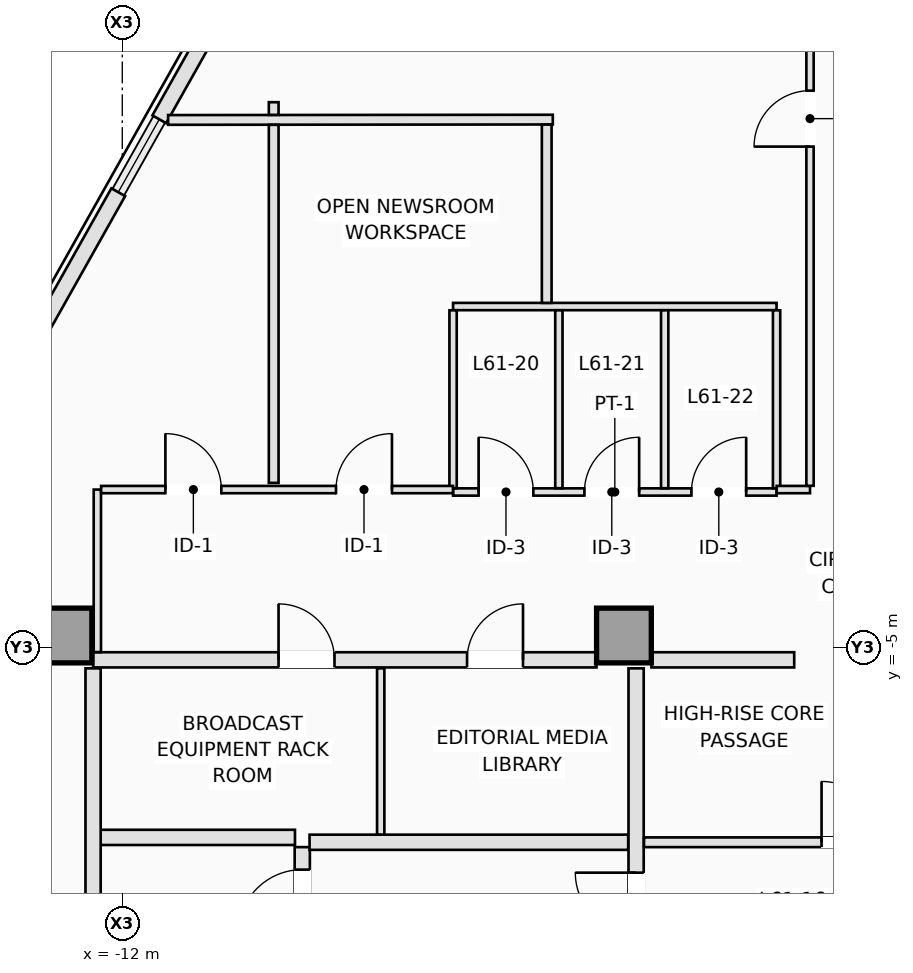
"""IFC4 building model, lengths in metres.
Left out: names, types, materials, properties, quantities, classifications, styles, units other than length and angle.
Written with IfcOpenShell. Run it as: python <this file> out.ifc"""

import sys

from ifc_helpers import new_model, si_unit, direction, frame, frame_2d, origin, origin_2d, place, context, subcontext, project, spatial, rectangle, extrude, element, fill, save


model = new_model("IFC4")
c1 = context("Model", 3, precision=1e-05, world=origin(), true_north=direction((0.0, 1.0)))
c2 = subcontext(c1, "Body", "Model", "MODEL_VIEW")
j1 = project(units=[si_unit("LENGTHUNIT", "METRE"), si_unit("PLANEANGLEUNIT", "RADIAN")], contexts=[c1])
p1 = place(None, origin())
s1 = spatial("IfcSite", under=j1, at=p1, CompositionType="ELEMENT")
p2 = place(p1, origin())
s2 = spatial("IfcBuilding", under=s1, at=p2, CompositionType="ELEMENT")
p3 = place(p2, frame((0.0, 0.0, 221.9)))
s3 = spatial("IfcBuildingStorey", under=s2, at=p3, CompositionType="ELEMENT", Elevation=221.9)
for number, where, z_axis, x_axis in (
    (1, (-12.95, -4.8, 0.0), (0.0, 0.0, 1.0), (1.0, 0.0, 0.0)),
    (2, (-3.75, -4.8, 0.0), (0.0, 0.0, 1.0), (1.0, 0.0, 0.0)),
):
    element("IfcColumn", number, at=place(p3, frame(where, z_axis=z_axis, x_axis=x_axis)), inside=s3, PredefinedType="COLUMN", context=c2, shape_type="SweptSolid", body=[
        extrude(rectangle(XDim=0.9, YDim=0.9, at=origin_2d()), origin(), (0.0, 0.0, 1.0), 3.5),
    ])
p4 = place(p3, frame((-14.217, -1.334, 0.0), z_axis=(0.0, 0.0, 1.0), x_axis=(0.490261239633, 0.871575537125, 0.0)))
e3 = element("IfcWall", 3, at=p4, inside=s3, PredefinedType="STANDARD", context=c2, shape_type="SweptSolid", body=[
    extrude(rectangle(XDim=4.388, YDim=0.26, at=frame_2d((2.194, 0.0))), origin(), (0.0, 0.0, 1.0), 3.25),
])
p5 = place(p3, frame((-11.392, 3.689, 0.0), z_axis=(0.0, 0.0, 1.0), x_axis=(0.490237464814, 0.871588910033, 0.0)))
e4 = element("IfcWall", 4, at=p5, inside=s3, PredefinedType="STANDARD", context=c2, shape_type="SweptSolid", body=[
    extrude(rectangle(XDim=4.388, YDim=0.26, at=frame_2d((2.194, 0.0))), origin(), (0.0, 0.0, 1.0), 3.25),
])
p6 = place(p3, frame((-9.04, -10.18, 0.0), z_axis=(0.0, 0.0, 1.0), x_axis=(0.0, 1.0, 0.0)))
e5 = element("IfcWall", 5, at=p6, inside=s3, PredefinedType="PARTITIONING", context=c2, shape_type="SweptSolid", body=[
    extrude(rectangle(XDim=1.9, YDim=0.25, at=frame_2d((0.95, 0.0))), origin(), (0.0, 0.0, 1.0), 3.25),
])
p7 = place(p6, frame((0.48, 0.0, 0.0)))
e6 = element("IfcOpeningElement", 6, at=p7, cuts=e5, PredefinedType="OPENING", context=c2, shape_type="SweptSolid", body=[
    extrude(rectangle(XDim=1.05, YDim=2.15, at=frame_2d((0.525, 1.075))), frame((0.0, 0.135, 0.0), z_axis=(0.0, -1.0, 0.0), x_axis=(1.0, 0.0, 0.0)), (0.0, 0.0, 1.0), 0.27),
])
p8 = place(p3, frame((-12.38, -8.12, 0.0), z_axis=(0.0, 0.0, 1.0), x_axis=(1.0, 0.0, 0.0)))
e7 = element("IfcWall", 7, at=p8, inside=s3, PredefinedType="PARTITIONING", context=c2, shape_type="SweptSolid", body=[
    extrude(rectangle(XDim=3.22, YDim=0.25, at=frame_2d((1.61, 0.0))), origin(), (0.0, 0.0, 1.0), 3.25),
])
p9 = place(p3, frame((-12.48, -10.18, 0.0), z_axis=(0.0, 0.0, 1.0), x_axis=(0.0, 1.0, 0.0)))
e8 = element("IfcWall", 8, at=p9, inside=s3, PredefinedType="PARTITIONING", context=c2, shape_type="SweptSolid", body=[
    extrude(rectangle(XDim=4.84, YDim=0.25, at=frame_2d((2.42, 0.0))), origin(), (0.0, 0.0, 1.0), 3.25),
])
p10 = place(p3, frame((-8.92, -8.2, 0.0), z_axis=(0.0, 0.0, 1.0), x_axis=(1.0, 0.0, 0.0)))
e9 = element("IfcWall", 9, at=p10, inside=s3, PredefinedType="PARTITIONING", context=c2, shape_type="SweptSolid", body=[
    extrude(rectangle(XDim=5.24, YDim=0.25, at=frame_2d((2.62, 0.0))), origin(), (0.0, 0.0, 1.0), 3.25),
])
p11 = place(p3, frame((-3.55, -15.898, 0.0), z_axis=(0.0, 0.0, 1.0), x_axis=(0.0, 1.0, 0.0)))
e10 = element("IfcWall", 10, at=p11, inside=s3, PredefinedType="PARTITIONING", context=c2, shape_type="SweptSolid", body=[
    extrude(rectangle(XDim=10.558, YDim=0.25, at=frame_2d((5.279, 0.0))), origin(), (0.0, 0.0, 1.0), 3.25),
])
p12 = place(p11, frame((6.198, 0.0, 0.0)))
e11 = element("IfcOpeningElement", 11, at=p12, cuts=e10, PredefinedType="OPENING", context=c2, shape_type="SweptSolid", body=[
    extrude(rectangle(XDim=1.0, YDim=2.15, at=frame_2d((0.5, 1.075))), frame((0.0, 0.135, 0.0), z_axis=(0.0, -1.0, 0.0), x_axis=(1.0, 0.0, 0.0)), (0.0, 0.0, 1.0), 0.27),
])
p13 = place(p3, frame((-12.48, -5.2, 0.0), z_axis=(0.0, 0.0, 1.0), x_axis=(1.0, 0.0, 0.0)))
e12 = element("IfcWall", 12, at=p13, inside=s3, PredefinedType="PARTITIONING", context=c2, shape_type="SweptSolid", body=[
    extrude(rectangle(XDim=8.278, YDim=0.25, at=frame_2d((4.139, 0.0))), origin(), (0.0, 0.0, 1.0), 3.25),
])
p14 = place(p13, frame((3.05, 0.0, 0.0)))
e13 = element("IfcOpeningElement", 13, at=p14, cuts=e12, PredefinedType="OPENING", context=c2, shape_type="SweptSolid", body=[
    extrude(rectangle(XDim=0.92, YDim=2.12, at=frame_2d((0.46, 1.06))), frame((0.0, 0.135, 0.0), z_axis=(0.0, -1.0, 0.0), x_axis=(1.0, 0.0, 0.0)), (0.0, 0.0, 1.0), 0.27),
])
p15 = place(p13, frame((6.15, 0.0, 0.0)))
e14 = element("IfcOpeningElement", 14, at=p15, cuts=e12, PredefinedType="OPENING", context=c2, shape_type="SweptSolid", body=[
    extrude(rectangle(XDim=0.92, YDim=2.12, at=frame_2d((0.46, 1.06))), frame((0.0, 0.135, 0.0), z_axis=(0.0, -1.0, 0.0), x_axis=(1.0, 0.0, 0.0)), (0.0, 0.0, 1.0), 0.27),
])
p16 = place(p3, frame((-3.298, -5.2, 0.0), z_axis=(0.0, 0.0, 1.0), x_axis=(1.0, 0.0, 0.0)))
e15 = element("IfcWall", 15, at=p16, inside=s3, PredefinedType="PARTITIONING", context=c2, shape_type="SweptSolid", body=[
    extrude(rectangle(XDim=2.348, YDim=0.25, at=frame_2d((1.174, 0.0))), origin(), (0.0, 0.0, 1.0), 3.25),
])
p17 = place(p3, frame((-7.75, -8.073, 0.0), z_axis=(0.0, 0.0, 1.0), x_axis=(0.0, 1.0, 0.0)))
e16 = element("IfcWall", 16, at=p17, inside=s3, PredefinedType="PARTITIONING", context=c2, shape_type="SweptSolid", body=[
    extrude(rectangle(XDim=2.733, YDim=0.12, at=frame_2d((1.366, 0.0))), origin(), (0.0, 0.0, 1.0), 3.25),
])
p18 = place(p3, frame((-3.42, -8.2, 0.0), z_axis=(0.0, 0.0, 1.0), x_axis=(1.0, 0.0, 0.0)))
e17 = element("IfcWall", 17, at=p18, inside=s3, PredefinedType="PARTITIONING", context=c2, shape_type="SweptSolid", body=[
    extrude(rectangle(XDim=6.84, YDim=0.16, at=frame_2d((3.42, 0.0))), origin(), (0.0, 0.0, 1.0), 3.25),
])
p19 = place(p18, frame((2.92, 0.0, 0.0)))
e18 = element("IfcOpeningElement", 18, at=p19, cuts=e17, PredefinedType="OPENING", context=c2, shape_type="SweptSolid", body=[
    extrude(rectangle(XDim=1.0, YDim=2.15, at=frame_2d((0.5, 1.075))), frame((0.0, 0.09, 0.0), z_axis=(0.0, -1.0, 0.0), x_axis=(1.0, 0.0, 0.0)), (0.0, 0.0, 1.0), 0.18),
])
p20 = place(p3, frame((-6.56, -2.44, 0.0), z_axis=(0.0, 0.0, 1.0), x_axis=(1.0, 0.0, 0.0)))
e19 = element("IfcWall", 19, at=p20, inside=s3, PredefinedType="PARTITIONING", context=c2, shape_type="SweptSolid", body=[
    extrude(rectangle(XDim=5.32, YDim=0.12, at=frame_2d((2.66, 0.0))), origin(), (0.0, 0.0, 1.0), 2.943),
])
p21 = place(p20, frame((0.42, 0.0, 0.0)))
e20 = element("IfcOpeningElement", 20, at=p21, cuts=e19, PredefinedType="OPENING", context=c2, shape_type="SweptSolid", body=[
    extrude(rectangle(XDim=0.9, YDim=2.12, at=frame_2d((0.45, 1.06))), frame((0.0, 0.07, 0.0), z_axis=(0.0, -1.0, 0.0), x_axis=(1.0, 0.0, 0.0)), (0.0, 0.0, 1.0), 0.14),
])
p22 = place(p20, frame((2.16, 0.0, 0.0)))
e21 = element("IfcOpeningElement", 21, at=p22, cuts=e19, PredefinedType="OPENING", context=c2, shape_type="SweptSolid", body=[
    extrude(rectangle(XDim=0.9, YDim=2.12, at=frame_2d((0.45, 1.06))), frame((0.0, 0.07, 0.0), z_axis=(0.0, -1.0, 0.0), x_axis=(1.0, 0.0, 0.0)), (0.0, 0.0, 1.0), 0.14),
])
p23 = place(p20, frame((3.92, 0.0, 0.0)))
e22 = element("IfcOpeningElement", 22, at=p23, cuts=e19, PredefinedType="OPENING", context=c2, shape_type="SweptSolid", body=[
    extrude(rectangle(XDim=0.9, YDim=2.12, at=frame_2d((0.45, 1.06))), frame((0.0, 0.07, 0.0), z_axis=(0.0, -1.0, 0.0), x_axis=(1.0, 0.0, 0.0)), (0.0, 0.0, 1.0), 0.14),
])
p24 = place(p3, frame((-6.56, 0.61, 0.0), z_axis=(0.0, 0.0, 1.0), x_axis=(1.0, 0.0, 0.0)))
e23 = element("IfcWall", 23, at=p24, inside=s3, PredefinedType="PARTITIONING", context=c2, shape_type="SweptSolid", body=[
    extrude(rectangle(XDim=5.32, YDim=0.12, at=frame_2d((2.66, 0.0))), origin(), (0.0, 0.0, 1.0), 3.25),
])
for number, where, z_axis, x_axis in (
    (24, (-6.56, -2.378, 0.0), (0.0, 0.0, 1.0), (0.0, 1.0, 0.0)),
    (25, (-4.82, -2.378, 0.0), (0.0, 0.0, 1.0), (0.0, 1.0, 0.0)),
    (26, (-3.08, -2.378, 0.0), (0.0, 0.0, 1.0), (0.0, 1.0, 0.0)),
    (27, (-1.24, -2.378, 0.0), (0.0, 0.0, 1.0), (0.0, 1.0, 0.0)),
):
    element("IfcWall", number, at=place(p3, frame(where, z_axis=z_axis, x_axis=x_axis)), inside=s3, PredefinedType="PARTITIONING", context=c2, shape_type="SweptSolid", body=[
        extrude(rectangle(XDim=2.926, YDim=0.12, at=frame_2d((1.463, 0.0))), origin(), (0.0, 0.0, 1.0), 3.25),
    ])
p25 = place(p3, frame((-12.41, -5.073, 0.0), z_axis=(0.0, 0.0, 1.0), x_axis=(0.0, 1.0, 0.0)))
e28 = element("IfcWall", 28, at=p25, inside=s3, PredefinedType="PARTITIONING", context=c2, shape_type="SweptSolid", body=[
    extrude(rectangle(XDim=2.673, YDim=0.12, at=frame_2d((1.336, 0.0))), origin(), (0.0, 0.0, 1.0), 3.25),
])
p26 = place(p3, frame((-12.348, -2.4, 0.0), z_axis=(0.0, 0.0, 1.0), x_axis=(1.0, 0.0, 0.0)))
e29 = element("IfcWall", 29, at=p26, inside=s3, PredefinedType="PARTITIONING", context=c2, shape_type="SweptSolid", body=[
    extrude(rectangle(XDim=5.786, YDim=0.12, at=frame_2d((2.893, 0.0))), origin(), (0.0, 0.0, 1.0), 3.25),
])
p27 = place(p26, frame((3.863, 0.0, 0.0)))
e30 = element("IfcOpeningElement", 30, at=p27, cuts=e29, PredefinedType="OPENING", context=c2, shape_type="SweptSolid", body=[
    extrude(rectangle(XDim=0.92, YDim=2.12, at=frame_2d((0.46, 1.06))), frame((0.0, 0.07, 0.0), z_axis=(0.0, -1.0, 0.0), x_axis=(1.0, 0.0, 0.0)), (0.0, 0.0, 1.0), 0.14),
])
p28 = place(p26, frame((1.057, 0.0, 0.0)))
e31 = element("IfcOpeningElement", 31, at=p28, cuts=e29, PredefinedType="OPENING", context=c2, shape_type="SweptSolid", body=[
    extrude(rectangle(XDim=0.92, YDim=2.12, at=frame_2d((0.46, 1.06))), frame((0.0, 0.07, 0.0), z_axis=(0.0, -1.0, 0.0), x_axis=(1.0, 0.0, 0.0)), (0.0, 0.0, 1.0), 0.14),
])
p29 = place(p3, frame((-1.238, -2.4, 0.0), z_axis=(0.0, 0.0, 1.0), x_axis=(1.0, 0.0, 0.0)))
e32 = element("IfcWall", 32, at=p29, inside=s3, PredefinedType="PARTITIONING", context=c2, shape_type="SweptSolid", body=[
    extrude(rectangle(XDim=0.548, YDim=0.12, at=frame_2d((0.274, 0.0))), origin(), (0.0, 0.0, 1.0), 2.943),
])
p30 = place(p3, frame((-0.69, -2.338, 0.0), z_axis=(0.0, 0.0, 1.0), x_axis=(0.0, 1.0, 0.0)))
e33 = element("IfcWall", 33, at=p30, inside=s3, PredefinedType="PARTITIONING", context=c2, shape_type="SweptSolid", body=[
    extrude(rectangle(XDim=12.138, YDim=0.12, at=frame_2d((6.069, 0.0))), origin(), (0.0, 0.0, 1.0), 3.25),
])
p31 = place(p30, frame((5.578, 0.0, 0.0)))
e34 = element("IfcOpeningElement", 34, at=p31, cuts=e33, PredefinedType="OPENING", context=c2, shape_type="SweptSolid", body=[
    extrude(rectangle(XDim=0.92, YDim=2.12, at=frame_2d((0.46, 1.06))), frame((0.0, 0.07, 0.0), z_axis=(0.0, -1.0, 0.0), x_axis=(1.0, 0.0, 0.0)), (0.0, 0.0, 1.0), 0.14),
])
p32 = place(p3, frame((-4.92, 3.684, 0.0), z_axis=(0.0, 0.0, 1.0), x_axis=(-0.999999702129, -0.000771842932, 0.0)))
e35 = element("IfcWall", 35, at=p32, inside=s3, PredefinedType="PARTITIONING", context=c2, shape_type="SweptSolid", body=[
    extrude(rectangle(XDim=6.326, YDim=0.16, at=frame_2d((3.163, 0.0))), origin(), (0.0, 0.0, 1.0), 2.943),
])
p33 = place(p3, frame((-5.02, 0.67, 0.0), z_axis=(0.0, 0.0, 1.0), x_axis=(0.0, 1.0, 0.0)))
e36 = element("IfcWall", 36, at=p33, inside=s3, PredefinedType="PARTITIONING", context=c2, shape_type="SweptSolid", body=[
    extrude(rectangle(XDim=2.932, YDim=0.16, at=frame_2d((1.466, 0.0))), origin(), (0.0, 0.0, 1.0), 3.25),
])
p34 = place(p3, frame((-9.51, -2.29, 0.0), z_axis=(0.0, 0.0, 1.0), x_axis=(0.0, 1.0, 0.0)))
e37 = element("IfcWall", 37, at=p34, inside=s3, PredefinedType="PARTITIONING", context=c2, shape_type="SweptSolid", body=[
    extrude(rectangle(XDim=5.888, YDim=0.16, at=frame_2d((2.944, 0.0))), origin(), (0.0, 0.0, 1.0), 3.25),
])
p35 = place(p3, frame((-9.51, 3.762, 0.0), z_axis=(0.0, 0.0, 1.0), x_axis=(0.0, 1.0, 0.0)))
e38 = element("IfcWall", 38, at=p35, inside=s3, PredefinedType="PARTITIONING", context=c2, shape_type="SweptSolid", body=[
    extrude(rectangle(XDim=0.208, YDim=0.16, at=frame_2d((0.104, 0.0))), origin(), (0.0, 0.0, 1.0), 3.25),
])
p36 = place(p7, origin())
e39 = element("IfcDoor", 39, at=p36, inside=s3, OperationType="SINGLE_SWING_LEFT", PredefinedType="DOOR", context=c2, shape_type="SweptSolid", body=[
    extrude(rectangle(XDim=1.05, YDim=2.15, at=frame_2d((0.525, 1.075))), frame((0.0, 0.025, 0.0), z_axis=(0.0, -1.0, 0.0), x_axis=(1.0, 0.0, 0.0)), (0.0, 0.0, 1.0), 0.05),
])
fill(e6, e39)
p37 = place(p12, origin())
e40 = element("IfcDoor", 40, at=p37, inside=s3, OperationType="SINGLE_SWING_RIGHT", PredefinedType="DOOR", context=c2, shape_type="SweptSolid", body=[
    extrude(rectangle(XDim=1.0, YDim=2.15, at=frame_2d((0.5, 1.075))), frame((0.0, 0.025, 0.0), z_axis=(0.0, -1.0, 0.0), x_axis=(1.0, 0.0, 0.0)), (0.0, 0.0, 1.0), 0.05),
])
fill(e11, e40)
p38 = place(p14, origin())
e41 = element("IfcDoor", 41, at=p38, inside=s3, OperationType="SINGLE_SWING_LEFT", PredefinedType="DOOR", context=c2, shape_type="SweptSolid", body=[
    extrude(rectangle(XDim=0.92, YDim=2.12, at=frame_2d((0.46, 1.06))), frame((0.0, 0.025, 0.0), z_axis=(0.0, -1.0, 0.0), x_axis=(1.0, 0.0, 0.0)), (0.0, 0.0, 1.0), 0.05),
])
fill(e13, e41)
p39 = place(p15, origin())
e42 = element("IfcDoor", 42, at=p39, inside=s3, OperationType="SINGLE_SWING_RIGHT", PredefinedType="DOOR", context=c2, shape_type="SweptSolid", body=[
    extrude(rectangle(XDim=0.92, YDim=2.12, at=frame_2d((0.46, 1.06))), frame((0.0, 0.025, 0.0), z_axis=(0.0, -1.0, 0.0), x_axis=(1.0, 0.0, 0.0)), (0.0, 0.0, 1.0), 0.05),
])
fill(e14, e42)
p40 = place(p19, origin())
e43 = element("IfcDoor", 43, at=p40, inside=s3, OperationType="SINGLE_SWING_LEFT", PredefinedType="DOOR", context=c2, shape_type="SweptSolid", body=[
    extrude(rectangle(XDim=1.0, YDim=2.15, at=frame_2d((0.5, 1.075))), frame((0.0, 0.025, 0.0), z_axis=(0.0, -1.0, 0.0), x_axis=(1.0, 0.0, 0.0)), (0.0, 0.0, 1.0), 0.05),
])
fill(e18, e43)
p41 = place(p21, origin())
e44 = element("IfcDoor", 44, at=p41, inside=s3, OperationType="SINGLE_SWING_LEFT", PredefinedType="DOOR", context=c2, shape_type="SweptSolid", body=[
    extrude(rectangle(XDim=0.9, YDim=2.12, at=frame_2d((0.45, 1.06))), frame((0.0, 0.025, 0.0), z_axis=(0.0, -1.0, 0.0), x_axis=(1.0, 0.0, 0.0)), (0.0, 0.0, 1.0), 0.05),
])
fill(e20, e44)
p42 = place(p22, origin())
e45 = element("IfcDoor", 45, at=p42, inside=s3, OperationType="SINGLE_SWING_RIGHT", PredefinedType="DOOR", context=c2, shape_type="SweptSolid", body=[
    extrude(rectangle(XDim=0.9, YDim=2.12, at=frame_2d((0.45, 1.06))), frame((0.0, 0.025, 0.0), z_axis=(0.0, -1.0, 0.0), x_axis=(1.0, 0.0, 0.0)), (0.0, 0.0, 1.0), 0.05),
])
fill(e21, e45)
p43 = place(p23, origin())
e46 = element("IfcDoor", 46, at=p43, inside=s3, OperationType="SINGLE_SWING_RIGHT", PredefinedType="DOOR", context=c2, shape_type="SweptSolid", body=[
    extrude(rectangle(XDim=0.9, YDim=2.12, at=frame_2d((0.45, 1.06))), frame((0.0, 0.025, 0.0), z_axis=(0.0, -1.0, 0.0), x_axis=(1.0, 0.0, 0.0)), (0.0, 0.0, 1.0), 0.05),
])
fill(e22, e46)
p44 = place(p31, origin())
e47 = element("IfcDoor", 47, at=p44, inside=s3, OperationType="SINGLE_SWING_LEFT", PredefinedType="DOOR", context=c2, shape_type="SweptSolid", body=[
    extrude(rectangle(XDim=0.92, YDim=2.12, at=frame_2d((0.46, 1.06))), frame((0.0, 0.025, 0.0), z_axis=(0.0, -1.0, 0.0), x_axis=(1.0, 0.0, 0.0)), (0.0, 0.0, 1.0), 0.05),
])
fill(e34, e47)
p45 = place(p27, origin())
e48 = element("IfcDoor", 48, at=p45, inside=s3, OperationType="SINGLE_SWING_RIGHT", PredefinedType="DOOR", context=c2, shape_type="SweptSolid", body=[
    extrude(rectangle(XDim=0.92, YDim=2.12, at=frame_2d((0.46, 1.06))), frame((0.0, 0.025, 0.0), z_axis=(0.0, -1.0, 0.0), x_axis=(1.0, 0.0, 0.0)), (0.0, 0.0, 1.0), 0.05),
])
fill(e30, e48)
p46 = place(p28, origin())
e49 = element("IfcDoor", 49, at=p46, inside=s3, OperationType="SINGLE_SWING_LEFT", PredefinedType="DOOR", context=c2, shape_type="SweptSolid", body=[
    extrude(rectangle(XDim=0.92, YDim=2.12, at=frame_2d((0.46, 1.06))), frame((0.0, 0.025, 0.0), z_axis=(0.0, -1.0, 0.0), x_axis=(1.0, 0.0, 0.0)), (0.0, 0.0, 1.0), 0.05),
])
fill(e31, e49)
save(model, sys.argv[1])
